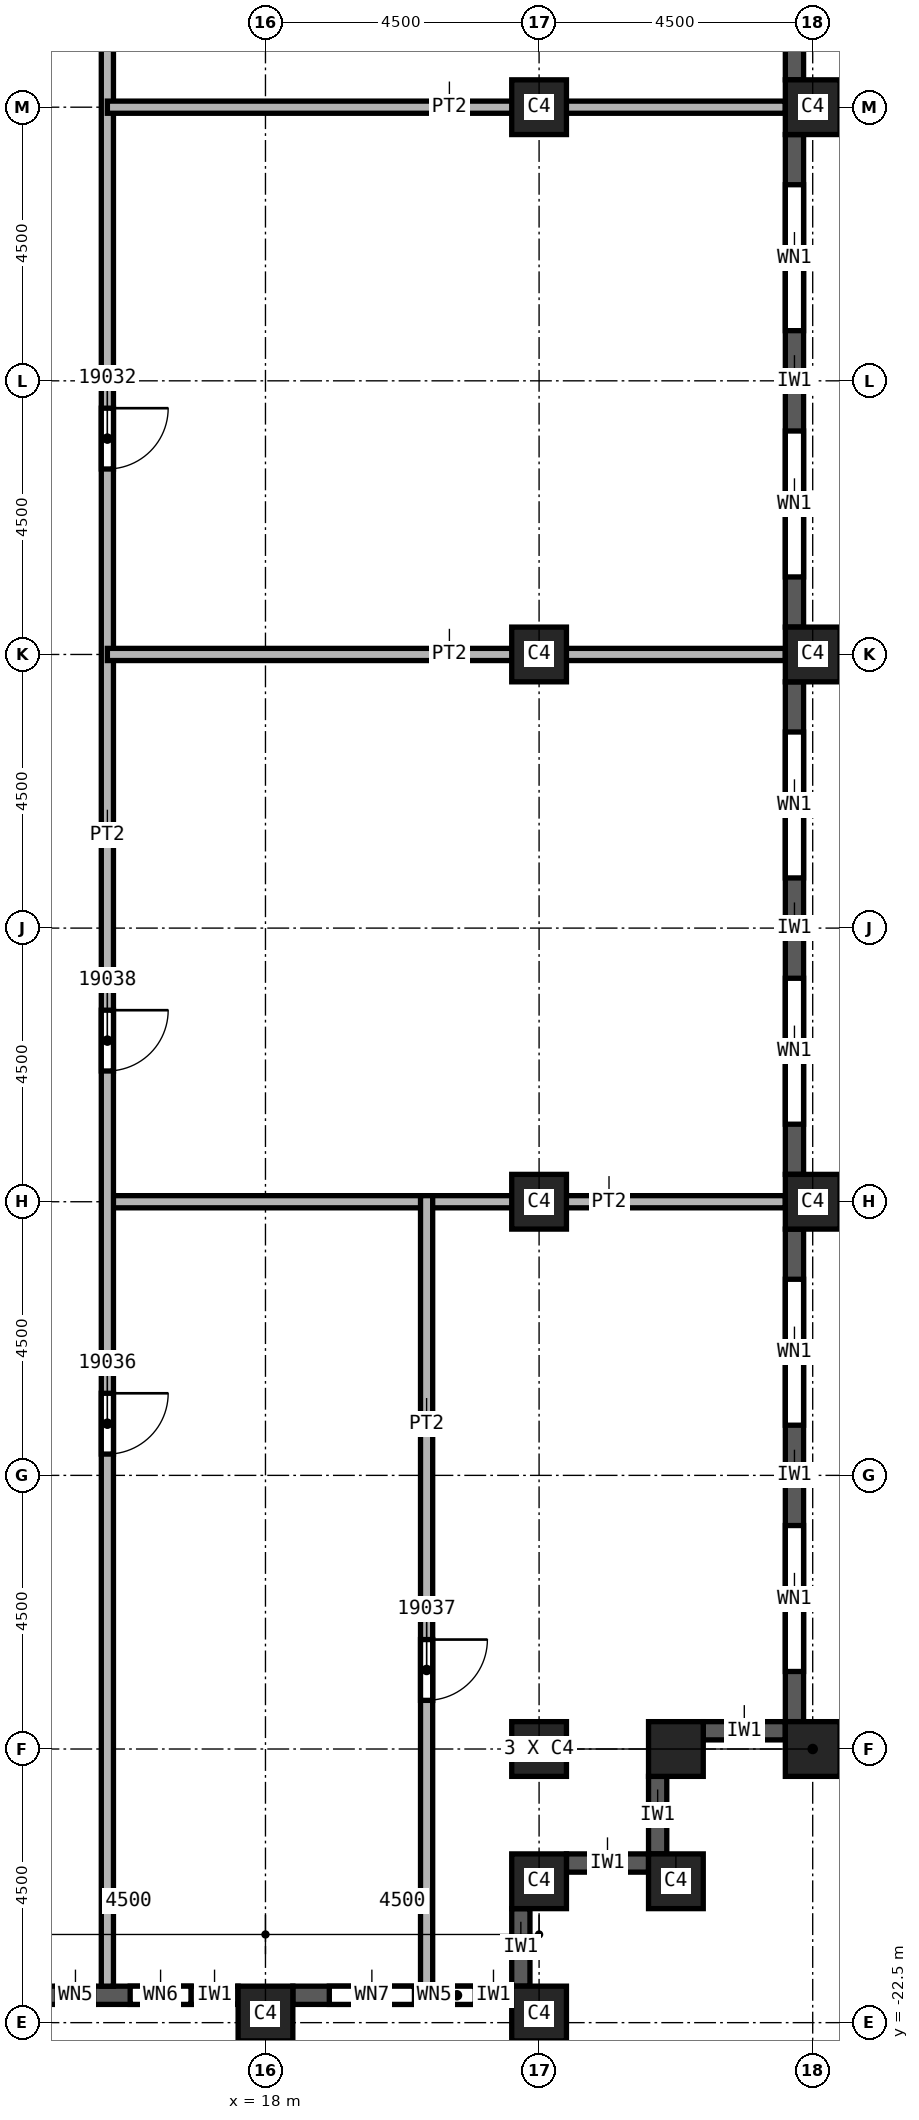
"""IFC4 building model, lengths in metres.
Left out: names, types, materials, properties, quantities, classifications, styles, units other than length and angle.
Written with IfcOpenShell. Run it as: python <this file> out.ifc"""

import sys

from ifc_helpers import new_model, si_unit, direction, frame, frame_2d, origin, origin_2d, place, context, subcontext, project, spatial, rectangle, extrude, element, fill, save


model = new_model("IFC4")
c1 = context("Model", 3, precision=1e-05, world=origin(), true_north=direction((0.0, 1.0)))
c2 = subcontext(c1, "Body", "Model", "MODEL_VIEW")
j1 = project(units=[si_unit("LENGTHUNIT", "METRE"), si_unit("PLANEANGLEUNIT", "RADIAN")], contexts=[c1])
p1 = place(None, origin())
s1 = spatial("IfcSite", under=j1, at=p1, CompositionType="ELEMENT")
p2 = place(p1, origin())
s2 = spatial("IfcBuilding", under=s1, at=p2, CompositionType="ELEMENT")
p3 = place(p2, frame((0.0, 0.0, 282.0)))
s3 = spatial("IfcBuildingStorey", under=s2, at=p3, CompositionType="ELEMENT", Elevation=282.0)
for number, where, z_axis, x_axis in (
    (1, (22.5, 0.0, 0.0), (0.0, 0.0, 1.0), (1.0, 0.0, 0.0)),
    (2, (22.5, 9.0, 0.0), (0.0, 0.0, 1.0), (1.0, 0.0, 0.0)),
    (3, (22.5, -9.0, 0.0), (0.0, 0.0, 1.0), (1.0, 0.0, 0.0)),
    (4, (22.5, -18.0, 0.0), (0.0, 0.0, 1.0), (1.0, 0.0, 0.0)),
    (5, (27.0, 0.0, 0.0), (0.0, 0.0, 1.0), (0.0, 1.0, 0.0)),
    (6, (27.0, 9.0, 0.0), (0.0, 0.0, 1.0), (0.0, 1.0, 0.0)),
    (7, (27.0, -9.0, 0.0), (0.0, 0.0, 1.0), (0.0, 1.0, 0.0)),
    (8, (27.0, -18.0, 0.0), (0.0, 0.0, 1.0), (0.0, 1.0, 0.0)),
    (9, (18.0, -22.35, 0.0), (0.0, 0.0, 1.0), (1.0, 0.0, 0.0)),
    (10, (22.5, -22.35, 0.0), (0.0, 0.0, 1.0), (1.0, 0.0, 0.0)),
    (11, (22.5, -20.175, 0.0), (0.0, 0.0, 1.0), (1.0, 0.0, 0.0)),
    (12, (24.75, -20.175, 0.0), (0.0, 0.0, 1.0), (1.0, 0.0, 0.0)),
    (13, (24.75, -18.0, 0.0), (0.0, 0.0, 1.0), (1.0, 0.0, 0.0)),
):
    element("IfcColumn", number, at=place(p3, frame(where, z_axis=z_axis, x_axis=x_axis)), inside=s3, PredefinedType="COLUMN", context=c2, shape_type="SweptSolid", body=[
        extrude(rectangle(XDim=0.9, YDim=0.9, at=origin_2d()), origin(), (0.0, 0.0, 1.0), 3.72),
    ])
p4 = place(p3, frame((13.95, -22.05, 0.0), z_axis=(0.0, 0.0, 1.0), x_axis=(1.0, 0.0, 0.0)))
e14 = element("IfcWall", 14, at=p4, inside=s3, PredefinedType="SOLIDWALL", context=c2, shape_type="SweptSolid", body=[
    extrude(rectangle(XDim=3.6, YDim=0.3, at=frame_2d((1.8, 0.0))), origin(), (0.0, 0.0, 1.0), 3.12),
])
p5 = place(p4, frame((0.625, 0.0, 0.8)))
e15 = element("IfcOpeningElement", 15, at=p5, cuts=e14, PredefinedType="OPENING", context=c2, shape_type="SweptSolid", body=[
    extrude(rectangle(XDim=0.6, YDim=1.95, at=frame_2d((0.3, 0.975))), frame((0.0, 0.15, 0.0), z_axis=(0.0, -1.0, 0.0), x_axis=(1.0, 0.0, 0.0)), (0.0, 0.0, 1.0), 0.3),
])
p6 = place(p4, frame((1.825, 0.0, 0.8)))
e16 = element("IfcOpeningElement", 16, at=p6, cuts=e14, PredefinedType="OPENING", context=c2, shape_type="SweptSolid", body=[
    extrude(rectangle(XDim=1.0, YDim=1.95, at=frame_2d((0.5, 0.975))), frame((0.0, 0.15, 0.0), z_axis=(0.0, -1.0, 0.0), x_axis=(1.0, 0.0, 0.0)), (0.0, 0.0, 1.0), 0.3),
])
p7 = place(p3, frame((18.45, -22.05, 0.0), z_axis=(0.0, 0.0, 1.0), x_axis=(1.0, 0.0, 0.0)))
e17 = element("IfcWall", 17, at=p7, inside=s3, PredefinedType="SOLIDWALL", context=c2, shape_type="SweptSolid", body=[
    extrude(rectangle(XDim=3.6, YDim=0.3, at=frame_2d((1.8, 0.0))), origin(), (0.0, 0.0, 1.0), 3.12),
])
p8 = place(p7, frame((0.6, 0.0, 0.8)))
e18 = element("IfcOpeningElement", 18, at=p8, cuts=e17, PredefinedType="OPENING", context=c2, shape_type="SweptSolid", body=[
    extrude(rectangle(XDim=1.4, YDim=1.95, at=frame_2d((0.7, 0.975))), frame((0.0, 0.15, 0.0), z_axis=(0.0, -1.0, 0.0), x_axis=(1.0, 0.0, 0.0)), (0.0, 0.0, 1.0), 0.3),
])
p9 = place(p7, frame((2.4, 0.0, 0.8)))
e19 = element("IfcOpeningElement", 19, at=p9, cuts=e17, PredefinedType="OPENING", context=c2, shape_type="SweptSolid", body=[
    extrude(rectangle(XDim=0.6, YDim=1.95, at=frame_2d((0.3, 0.975))), frame((0.0, 0.15, 0.0), z_axis=(0.0, -1.0, 0.0), x_axis=(1.0, 0.0, 0.0)), (0.0, 0.0, 1.0), 0.3),
])
p10 = place(p3, frame((22.2, -21.9, 0.0), z_axis=(0.0, 0.0, 1.0), x_axis=(0.0, 1.0, 0.0)))
e20 = element("IfcWall", 20, at=p10, inside=s3, PredefinedType="SOLIDWALL", context=c2, shape_type="SweptSolid", body=[
    extrude(rectangle(XDim=1.275, YDim=0.3, at=frame_2d((0.637, 0.0))), origin(), (0.0, 0.0, 1.0), 3.12),
])
p11 = place(p3, frame((22.95, -19.875, 0.0), z_axis=(0.0, 0.0, 1.0), x_axis=(1.0, 0.0, 0.0)))
e21 = element("IfcWall", 21, at=p11, inside=s3, PredefinedType="SOLIDWALL", context=c2, shape_type="SweptSolid", body=[
    extrude(rectangle(XDim=1.35, YDim=0.3, at=frame_2d((0.675, 0.0))), origin(), (0.0, 0.0, 1.0), 3.12),
])
p12 = place(p3, frame((24.45, -19.725, 0.0), z_axis=(0.0, 0.0, 1.0), x_axis=(0.0, 1.0, 0.0)))
e22 = element("IfcWall", 22, at=p12, inside=s3, PredefinedType="SOLIDWALL", context=c2, shape_type="SweptSolid", body=[
    extrude(rectangle(XDim=1.275, YDim=0.3, at=frame_2d((0.638, 0.0))), origin(), (0.0, 0.0, 1.0), 3.12),
])
p13 = place(p3, frame((25.2, -17.7, 0.0), z_axis=(0.0, 0.0, 1.0), x_axis=(1.0, 0.0, 0.0)))
e23 = element("IfcWall", 23, at=p13, inside=s3, PredefinedType="SOLIDWALL", context=c2, shape_type="SweptSolid", body=[
    extrude(rectangle(XDim=1.35, YDim=0.3, at=frame_2d((0.675, 0.0))), origin(), (0.0, 0.0, 1.0), 3.12),
])
p14 = place(p3, frame((26.7, -17.55, 0.0), z_axis=(0.0, 0.0, 1.0), x_axis=(0.0, 1.0, 0.0)))
e24 = element("IfcWall", 24, at=p14, inside=s3, PredefinedType="SOLIDWALL", context=c2, shape_type="SweptSolid", body=[
    extrude(rectangle(XDim=8.1, YDim=0.3, at=frame_2d((4.05, 0.0))), origin(), (0.0, 0.0, 1.0), 3.12),
])
p15 = place(p14, frame((0.825, 0.0, 0.8)))
e25 = element("IfcOpeningElement", 25, at=p15, cuts=e24, PredefinedType="OPENING", context=c2, shape_type="SweptSolid", body=[
    extrude(rectangle(XDim=2.4, YDim=1.95, at=frame_2d((1.2, 0.975))), frame((0.0, 0.15, 0.0), z_axis=(0.0, -1.0, 0.0), x_axis=(1.0, 0.0, 0.0)), (0.0, 0.0, 1.0), 0.3),
])
p16 = place(p14, frame((4.875, 0.0, 0.8)))
e26 = element("IfcOpeningElement", 26, at=p16, cuts=e24, PredefinedType="OPENING", context=c2, shape_type="SweptSolid", body=[
    extrude(rectangle(XDim=2.4, YDim=1.95, at=frame_2d((1.2, 0.975))), frame((0.0, 0.15, 0.0), z_axis=(0.0, -1.0, 0.0), x_axis=(1.0, 0.0, 0.0)), (0.0, 0.0, 1.0), 0.3),
])
p17 = place(p3, frame((26.7, -8.55, 0.0), z_axis=(0.0, 0.0, 1.0), x_axis=(0.0, 1.0, 0.0)))
e27 = element("IfcWall", 27, at=p17, inside=s3, PredefinedType="SOLIDWALL", context=c2, shape_type="SweptSolid", body=[
    extrude(rectangle(XDim=8.1, YDim=0.3, at=frame_2d((4.05, 0.0))), origin(), (0.0, 0.0, 1.0), 3.12),
])
p18 = place(p17, frame((0.825, 0.0, 0.8)))
e28 = element("IfcOpeningElement", 28, at=p18, cuts=e27, PredefinedType="OPENING", context=c2, shape_type="SweptSolid", body=[
    extrude(rectangle(XDim=2.4, YDim=1.95, at=frame_2d((1.2, 0.975))), frame((0.0, 0.15, 0.0), z_axis=(0.0, -1.0, 0.0), x_axis=(1.0, 0.0, 0.0)), (0.0, 0.0, 1.0), 0.3),
])
p19 = place(p17, frame((4.875, 0.0, 0.8)))
e29 = element("IfcOpeningElement", 29, at=p19, cuts=e27, PredefinedType="OPENING", context=c2, shape_type="SweptSolid", body=[
    extrude(rectangle(XDim=2.4, YDim=1.95, at=frame_2d((1.2, 0.975))), frame((0.0, 0.15, 0.0), z_axis=(0.0, -1.0, 0.0), x_axis=(1.0, 0.0, 0.0)), (0.0, 0.0, 1.0), 0.3),
])
p20 = place(p3, frame((26.7, 0.45, 0.0), z_axis=(0.0, 0.0, 1.0), x_axis=(0.0, 1.0, 0.0)))
e30 = element("IfcWall", 30, at=p20, inside=s3, PredefinedType="SOLIDWALL", context=c2, shape_type="SweptSolid", body=[
    extrude(rectangle(XDim=8.1, YDim=0.3, at=frame_2d((4.05, 0.0))), origin(), (0.0, 0.0, 1.0), 3.12),
])
p21 = place(p20, frame((0.825, 0.0, 0.8)))
e31 = element("IfcOpeningElement", 31, at=p21, cuts=e30, PredefinedType="OPENING", context=c2, shape_type="SweptSolid", body=[
    extrude(rectangle(XDim=2.4, YDim=1.95, at=frame_2d((1.2, 0.975))), frame((0.0, 0.15, 0.0), z_axis=(0.0, -1.0, 0.0), x_axis=(1.0, 0.0, 0.0)), (0.0, 0.0, 1.0), 0.3),
])
p22 = place(p20, frame((4.875, 0.0, 0.8)))
e32 = element("IfcOpeningElement", 32, at=p22, cuts=e30, PredefinedType="OPENING", context=c2, shape_type="SweptSolid", body=[
    extrude(rectangle(XDim=2.4, YDim=1.95, at=frame_2d((1.2, 0.975))), frame((0.0, 0.15, 0.0), z_axis=(0.0, -1.0, 0.0), x_axis=(1.0, 0.0, 0.0)), (0.0, 0.0, 1.0), 0.3),
])
p23 = place(p3, frame((26.7, 9.45, 0.0), z_axis=(0.0, 0.0, 1.0), x_axis=(0.0, 1.0, 0.0)))
e33 = element("IfcWall", 33, at=p23, inside=s3, PredefinedType="SOLIDWALL", context=c2, shape_type="SweptSolid", body=[
    extrude(rectangle(XDim=8.1, YDim=0.3, at=frame_2d((4.05, 0.0))), origin(), (0.0, 0.0, 1.0), 3.12),
])
p24 = place(p23, frame((0.825, 0.0, 0.8)))
e34 = element("IfcOpeningElement", 34, at=p24, cuts=e33, PredefinedType="OPENING", context=c2, shape_type="SweptSolid", body=[
    extrude(rectangle(XDim=2.4, YDim=1.95, at=frame_2d((1.2, 0.975))), frame((0.0, 0.15, 0.0), z_axis=(0.0, -1.0, 0.0), x_axis=(1.0, 0.0, 0.0)), (0.0, 0.0, 1.0), 0.3),
])
p25 = place(p23, frame((4.875, 0.0, 0.8)))
e35 = element("IfcOpeningElement", 35, at=p25, cuts=e33, PredefinedType="OPENING", context=c2, shape_type="SweptSolid", body=[
    extrude(rectangle(XDim=2.4, YDim=1.95, at=frame_2d((1.2, 0.975))), frame((0.0, 0.15, 0.0), z_axis=(0.0, -1.0, 0.0), x_axis=(1.0, 0.0, 0.0)), (0.0, 0.0, 1.0), 0.3),
])
p26 = place(p3, frame((15.4, -9.0, 0.0), z_axis=(0.0, 0.0, 1.0), x_axis=(1.0, 0.0, 0.0)))
e36 = element("IfcWall", 36, at=p26, inside=s3, PredefinedType="PARTITIONING", context=c2, shape_type="SweptSolid", body=[
    extrude(rectangle(XDim=11.15, YDim=0.2, at=frame_2d((5.575, 0.0))), origin(), (0.0, 0.0, 1.0), 3.72),
])
p27 = place(p3, frame((15.4, 21.9, 0.0), z_axis=(0.0, 0.0, 1.0), x_axis=(0.0, -1.0, 0.0)))
e37 = element("IfcWall", 37, at=p27, inside=s3, PredefinedType="PARTITIONING", context=c2, shape_type="SweptSolid", body=[
    extrude(rectangle(XDim=43.8, YDim=0.2, at=frame_2d((21.9, 0.0))), origin(), (0.0, 0.0, 1.0), 3.72),
])
p28 = place(p27, frame((17.85, 0.0, 0.0)))
e38 = element("IfcOpeningElement", 38, at=p28, cuts=e37, PredefinedType="OPENING", context=c2, shape_type="SweptSolid", body=[
    extrude(rectangle(XDim=1.0, YDim=2.1, at=frame_2d((0.5, 1.05))), frame((0.0, 0.1, 0.0), z_axis=(0.0, -1.0, 0.0), x_axis=(1.0, 0.0, 0.0)), (0.0, 0.0, 1.0), 0.2),
])
p29 = place(p27, frame((10.2, 0.0, 0.0)))
e39 = element("IfcOpeningElement", 39, at=p29, cuts=e37, PredefinedType="OPENING", context=c2, shape_type="SweptSolid", body=[
    extrude(rectangle(XDim=1.0, YDim=2.1, at=frame_2d((0.5, 1.05))), frame((0.0, 0.1, 0.0), z_axis=(0.0, -1.0, 0.0), x_axis=(1.0, 0.0, 0.0)), (0.0, 0.0, 1.0), 0.2),
])
p30 = place(p27, frame((2.8, 0.0, 0.0)))
e40 = element("IfcOpeningElement", 40, at=p30, cuts=e37, PredefinedType="OPENING", context=c2, shape_type="SweptSolid", body=[
    extrude(rectangle(XDim=1.0, YDim=2.1, at=frame_2d((0.5, 1.05))), frame((0.0, 0.1, 0.0), z_axis=(0.0, -1.0, 0.0), x_axis=(1.0, 0.0, 0.0)), (0.0, 0.0, 1.0), 0.2),
])
p31 = place(p27, frame((34.05, 0.0, 0.0)))
e41 = element("IfcOpeningElement", 41, at=p31, cuts=e37, PredefinedType="OPENING", context=c2, shape_type="SweptSolid", body=[
    extrude(rectangle(XDim=1.0, YDim=2.1, at=frame_2d((0.5, 1.05))), frame((0.0, 0.1, 0.0), z_axis=(0.0, -1.0, 0.0), x_axis=(1.0, 0.0, 0.0)), (0.0, 0.0, 1.0), 0.2),
])
p32 = place(p27, frame((27.75, 0.0, 0.0)))
e42 = element("IfcOpeningElement", 42, at=p32, cuts=e37, PredefinedType="OPENING", context=c2, shape_type="SweptSolid", body=[
    extrude(rectangle(XDim=1.0, YDim=2.1, at=frame_2d((0.5, 1.05))), frame((0.0, 0.1, 0.0), z_axis=(0.0, -1.0, 0.0), x_axis=(1.0, 0.0, 0.0)), (0.0, 0.0, 1.0), 0.2),
])
p33 = place(p3, frame((15.4, 9.0, 0.0), z_axis=(0.0, 0.0, 1.0), x_axis=(1.0, 0.0, 0.0)))
e43 = element("IfcWall", 43, at=p33, inside=s3, PredefinedType="PARTITIONING", context=c2, shape_type="SweptSolid", body=[
    extrude(rectangle(XDim=11.15, YDim=0.2, at=frame_2d((5.575, 0.0))), origin(), (0.0, 0.0, 1.0), 3.72),
])
p34 = place(p3, frame((20.65, -8.9, 0.0), z_axis=(0.0, 0.0, 1.0), x_axis=(0.0, -1.0, 0.0)))
e44 = element("IfcWall", 44, at=p34, inside=s3, PredefinedType="PARTITIONING", context=c2, shape_type="SweptSolid", body=[
    extrude(rectangle(XDim=13.0, YDim=0.2, at=frame_2d((6.5, 0.0))), origin(), (0.0, 0.0, 1.0), 3.72),
])
p35 = place(p34, frame((7.3, 0.0, 0.0)))
e45 = element("IfcOpeningElement", 45, at=p35, cuts=e44, PredefinedType="OPENING", context=c2, shape_type="SweptSolid", body=[
    extrude(rectangle(XDim=1.0, YDim=2.1, at=frame_2d((0.5, 1.05))), frame((0.0, 0.1, 0.0), z_axis=(0.0, -1.0, 0.0), x_axis=(1.0, 0.0, 0.0)), (0.0, 0.0, 1.0), 0.2),
])
p36 = place(p3, frame((26.55, 0.0, 0.0), z_axis=(0.0, 0.0, 1.0), x_axis=(-1.0, 0.0, 0.0)))
e46 = element("IfcWall", 46, at=p36, inside=s3, PredefinedType="PARTITIONING", context=c2, shape_type="SweptSolid", body=[
    extrude(rectangle(XDim=11.15, YDim=0.2, at=frame_2d((5.575, 0.0))), origin(), (0.0, 0.0, 1.0), 3.72),
])
p37 = place(p15, origin())
e47 = element("IfcWindow", 47, at=p37, inside=s3, PartitioningType="SINGLE_PANEL", PredefinedType="WINDOW", context=c2, shape_type="SweptSolid", body=[
    extrude(rectangle(XDim=2.4, YDim=1.95, at=frame_2d((1.2, 0.975))), frame((0.0, 0.03, 0.0), z_axis=(0.0, -1.0, 0.0), x_axis=(1.0, 0.0, 0.0)), (0.0, 0.0, 1.0), 0.06),
])
fill(e25, e47)
p38 = place(p16, origin())
e48 = element("IfcWindow", 48, at=p38, inside=s3, PartitioningType="SINGLE_PANEL", PredefinedType="WINDOW", context=c2, shape_type="SweptSolid", body=[
    extrude(rectangle(XDim=2.4, YDim=1.95, at=frame_2d((1.2, 0.975))), frame((0.0, 0.03, 0.0), z_axis=(0.0, -1.0, 0.0), x_axis=(1.0, 0.0, 0.0)), (0.0, 0.0, 1.0), 0.06),
])
fill(e26, e48)
p39 = place(p18, origin())
e49 = element("IfcWindow", 49, at=p39, inside=s3, PartitioningType="SINGLE_PANEL", PredefinedType="WINDOW", context=c2, shape_type="SweptSolid", body=[
    extrude(rectangle(XDim=2.4, YDim=1.95, at=frame_2d((1.2, 0.975))), frame((0.0, 0.03, 0.0), z_axis=(0.0, -1.0, 0.0), x_axis=(1.0, 0.0, 0.0)), (0.0, 0.0, 1.0), 0.06),
])
fill(e28, e49)
p40 = place(p19, origin())
e50 = element("IfcWindow", 50, at=p40, inside=s3, PartitioningType="SINGLE_PANEL", PredefinedType="WINDOW", context=c2, shape_type="SweptSolid", body=[
    extrude(rectangle(XDim=2.4, YDim=1.95, at=frame_2d((1.2, 0.975))), frame((0.0, 0.03, 0.0), z_axis=(0.0, -1.0, 0.0), x_axis=(1.0, 0.0, 0.0)), (0.0, 0.0, 1.0), 0.06),
])
fill(e29, e50)
p41 = place(p21, origin())
e51 = element("IfcWindow", 51, at=p41, inside=s3, PartitioningType="SINGLE_PANEL", PredefinedType="WINDOW", context=c2, shape_type="SweptSolid", body=[
    extrude(rectangle(XDim=2.4, YDim=1.95, at=frame_2d((1.2, 0.975))), frame((0.0, 0.03, 0.0), z_axis=(0.0, -1.0, 0.0), x_axis=(1.0, 0.0, 0.0)), (0.0, 0.0, 1.0), 0.06),
])
fill(e31, e51)
p42 = place(p22, origin())
e52 = element("IfcWindow", 52, at=p42, inside=s3, PartitioningType="SINGLE_PANEL", PredefinedType="WINDOW", context=c2, shape_type="SweptSolid", body=[
    extrude(rectangle(XDim=2.4, YDim=1.95, at=frame_2d((1.2, 0.975))), frame((0.0, 0.03, 0.0), z_axis=(0.0, -1.0, 0.0), x_axis=(1.0, 0.0, 0.0)), (0.0, 0.0, 1.0), 0.06),
])
fill(e32, e52)
p43 = place(p28, origin())
e53 = element("IfcDoor", 53, at=p43, inside=s3, OperationType="SINGLE_SWING_LEFT", PredefinedType="DOOR", context=c2, shape_type="SweptSolid", body=[
    extrude(rectangle(XDim=1.0, YDim=2.1, at=frame_2d((0.5, 1.05))), frame((0.0, 0.025, 0.0), z_axis=(0.0, -1.0, 0.0), x_axis=(1.0, 0.0, 0.0)), (0.0, 0.0, 1.0), 0.05),
])
fill(e38, e53)
p44 = place(p31, origin())
e54 = element("IfcDoor", 54, at=p44, inside=s3, OperationType="SINGLE_SWING_LEFT", PredefinedType="DOOR", context=c2, shape_type="SweptSolid", body=[
    extrude(rectangle(XDim=1.0, YDim=2.1, at=frame_2d((0.5, 1.05))), frame((0.0, 0.025, 0.0), z_axis=(0.0, -1.0, 0.0), x_axis=(1.0, 0.0, 0.0)), (0.0, 0.0, 1.0), 0.05),
])
fill(e41, e54)
p45 = place(p35, origin())
e55 = element("IfcDoor", 55, at=p45, inside=s3, OperationType="SINGLE_SWING_RIGHT", PredefinedType="DOOR", context=c2, shape_type="SweptSolid", body=[
    extrude(rectangle(XDim=1.0, YDim=2.1, at=frame_2d((0.5, 1.05))), frame((0.0, 0.025, 0.0), z_axis=(0.0, -1.0, 0.0), x_axis=(1.0, 0.0, 0.0)), (0.0, 0.0, 1.0), 0.05),
])
fill(e45, e55)
p46 = place(p32, origin())
e56 = element("IfcDoor", 56, at=p46, inside=s3, OperationType="SINGLE_SWING_LEFT", PredefinedType="DOOR", context=c2, shape_type="SweptSolid", body=[
    extrude(rectangle(XDim=1.0, YDim=2.1, at=frame_2d((0.5, 1.05))), frame((0.0, 0.025, 0.0), z_axis=(0.0, -1.0, 0.0), x_axis=(1.0, 0.0, 0.0)), (0.0, 0.0, 1.0), 0.05),
])
fill(e42, e56)
p47 = place(p5, origin())
e57 = element("IfcWindow", 57, at=p47, inside=s3, PartitioningType="SINGLE_PANEL", PredefinedType="WINDOW", context=c2, shape_type="SweptSolid", body=[
    extrude(rectangle(XDim=0.6, YDim=1.95, at=frame_2d((0.3, 0.975))), frame((0.0, 0.03, 0.0), z_axis=(0.0, -1.0, 0.0), x_axis=(1.0, 0.0, 0.0)), (0.0, 0.0, 1.0), 0.06),
])
fill(e15, e57)
p48 = place(p6, origin())
e58 = element("IfcWindow", 58, at=p48, inside=s3, PartitioningType="SINGLE_PANEL", PredefinedType="WINDOW", context=c2, shape_type="SweptSolid", body=[
    extrude(rectangle(XDim=1.0, YDim=1.95, at=frame_2d((0.5, 0.975))), frame((0.0, 0.03, 0.0), z_axis=(0.0, -1.0, 0.0), x_axis=(1.0, 0.0, 0.0)), (0.0, 0.0, 1.0), 0.06),
])
fill(e16, e58)
p49 = place(p8, origin())
e59 = element("IfcWindow", 59, at=p49, inside=s3, PartitioningType="SINGLE_PANEL", PredefinedType="WINDOW", context=c2, shape_type="SweptSolid", body=[
    extrude(rectangle(XDim=1.4, YDim=1.95, at=frame_2d((0.7, 0.975))), frame((0.0, 0.03, 0.0), z_axis=(0.0, -1.0, 0.0), x_axis=(1.0, 0.0, 0.0)), (0.0, 0.0, 1.0), 0.06),
])
fill(e18, e59)
p50 = place(p9, origin())
e60 = element("IfcWindow", 60, at=p50, inside=s3, PartitioningType="SINGLE_PANEL", PredefinedType="WINDOW", context=c2, shape_type="SweptSolid", body=[
    extrude(rectangle(XDim=0.6, YDim=1.95, at=frame_2d((0.3, 0.975))), frame((0.0, 0.03, 0.0), z_axis=(0.0, -1.0, 0.0), x_axis=(1.0, 0.0, 0.0)), (0.0, 0.0, 1.0), 0.06),
])
fill(e19, e60)
save(model, sys.argv[1])
